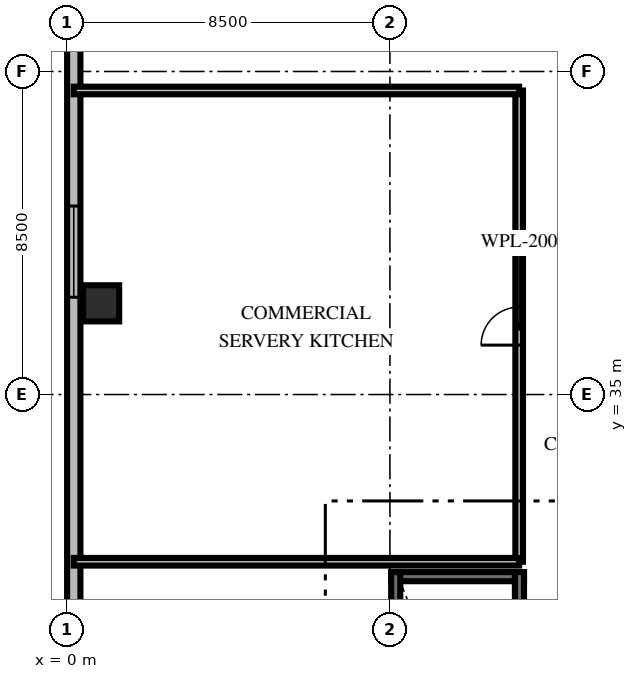
"""IFC4 building model, lengths in metres.
Left out: names, types, materials, properties, quantities, classifications, styles, units other than length and angle.
Written with IfcOpenShell. Run it as: python <this file> out.ifc"""

import sys

from ifc_helpers import new_model, si_unit, direction, frame, frame_2d, origin, origin_2d, place, context, subcontext, project, spatial, rectangle, extrude, element, fill, save


model = new_model("IFC4")
c1 = context("Model", 3, precision=1e-05, world=origin(), true_north=direction((0.0, 1.0)))
c2 = subcontext(c1, "Body", "Model", "MODEL_VIEW")
j1 = project(units=[si_unit("LENGTHUNIT", "METRE"), si_unit("PLANEANGLEUNIT", "RADIAN")], contexts=[c1])
p1 = place(None, origin())
s1 = spatial("IfcSite", under=j1, at=p1, CompositionType="ELEMENT")
p2 = place(p1, origin())
s2 = spatial("IfcBuilding", under=s1, at=p2, CompositionType="ELEMENT")
p3 = place(p2, frame((0.0, 0.0, 20.4)))
s3 = spatial("IfcBuildingStorey", under=s2, at=p3, CompositionType="ELEMENT", Elevation=20.4)
p4 = place(p3, frame((8.532, 30.208, 0.0), z_axis=(0.0, 0.0, 1.0), x_axis=(1.0, 0.0, 0.0)))
e1 = element("IfcWall", 1, at=p4, inside=s3, PredefinedType="SHEAR", context=c2, shape_type="SweptSolid", body=[
    extrude(rectangle(XDim=3.496, YDim=0.24, at=frame_2d((1.748, 0.0))), origin(), (0.0, 0.0, 1.0), 4.8),
])
p5 = place(p3, frame((8.652, 20.772, 0.0), z_axis=(0.0, 0.0, 1.0), x_axis=(0.0, 1.0, 0.0)))
e2 = element("IfcWall", 2, at=p5, inside=s3, PredefinedType="SHEAR", context=c2, shape_type="SweptSolid", body=[
    extrude(rectangle(XDim=9.556, YDim=0.24, at=frame_2d((4.778, 0.0))), origin(), (0.0, 0.0, 1.0), 4.8),
])
p6 = place(p3, frame((11.908, 20.772, 0.0), z_axis=(0.0, 0.0, 1.0), x_axis=(0.0, 1.0, 0.0)))
e3 = element("IfcWall", 3, at=p6, inside=s3, PredefinedType="SHEAR", context=c2, shape_type="SweptSolid", body=[
    extrude(rectangle(XDim=9.556, YDim=0.24, at=frame_2d((4.778, 0.0))), origin(), (0.0, 0.0, 1.0), 4.8),
])
p7 = place(p6, frame((0.55, 0.0, 0.0)))
e4 = element("IfcOpeningElement", 4, at=p7, cuts=e3, PredefinedType="OPENING", context=c2, shape_type="SweptSolid", body=[
    extrude(rectangle(XDim=1.05, YDim=2.15, at=frame_2d((0.525, 1.075))), frame((0.0, 0.13, 0.0), z_axis=(0.0, -1.0, 0.0), x_axis=(1.0, 0.0, 0.0)), (0.0, 0.0, 1.0), 0.26),
])
p8 = place(p3, frame((0.9, 37.4, 0.0), z_axis=(0.0, 0.0, 1.0), x_axis=(1.0, 0.0, 0.0)))
e5 = element("IfcColumn", 5, at=p8, inside=s3, PredefinedType="COLUMN", context=c2, shape_type="SweptSolid", body=[
    extrude(rectangle(XDim=0.95, YDim=0.95, at=origin_2d()), origin(), (0.0, 0.0, 1.0), 4.8),
])
p9 = place(p3, frame((0.18, 0.36, 0.0), z_axis=(0.0, 0.0, 1.0), x_axis=(0.0, 1.0, 0.0)))
e6 = element("IfcWall", 6, at=p9, inside=s3, PredefinedType="SOLIDWALL", context=c2, shape_type="SweptSolid", body=[
    extrude(rectangle(XDim=51.28, YDim=0.35, at=frame_2d((25.64, 0.0))), origin(), (0.0, 0.0, 1.0), 3.76),
])
p10 = place(p9, frame((3.2, 0.0, 0.85)))
e7 = element("IfcOpeningElement", 7, at=p10, cuts=e6, PredefinedType="OPENING", context=c2, shape_type="SweptSolid", body=[
    extrude(rectangle(XDim=2.4, YDim=2.4, at=frame_2d((1.2, 1.2))), frame((0.0, 0.185, 0.0), z_axis=(0.0, -1.0, 0.0), x_axis=(1.0, 0.0, 0.0)), (0.0, 0.0, 1.0), 0.37),
])
p11 = place(p9, frame((11.7, 0.0, 0.85)))
e8 = element("IfcOpeningElement", 8, at=p11, cuts=e6, PredefinedType="OPENING", context=c2, shape_type="SweptSolid", body=[
    extrude(rectangle(XDim=2.4, YDim=2.4, at=frame_2d((1.2, 1.2))), frame((0.0, 0.185, 0.0), z_axis=(0.0, -1.0, 0.0), x_axis=(1.0, 0.0, 0.0)), (0.0, 0.0, 1.0), 0.37),
])
p12 = place(p9, frame((22.05, 0.0, 0.85)))
e9 = element("IfcOpeningElement", 9, at=p12, cuts=e6, PredefinedType="OPENING", context=c2, shape_type="SweptSolid", body=[
    extrude(rectangle(XDim=2.4, YDim=2.4, at=frame_2d((1.2, 1.2))), frame((0.0, 0.185, 0.0), z_axis=(0.0, -1.0, 0.0), x_axis=(1.0, 0.0, 0.0)), (0.0, 0.0, 1.0), 0.37),
])
p13 = place(p9, frame((37.2, 0.0, 0.85)))
e10 = element("IfcOpeningElement", 10, at=p13, cuts=e6, PredefinedType="OPENING", context=c2, shape_type="SweptSolid", body=[
    extrude(rectangle(XDim=2.4, YDim=2.4, at=frame_2d((1.2, 1.2))), frame((0.0, 0.185, 0.0), z_axis=(0.0, -1.0, 0.0), x_axis=(1.0, 0.0, 0.0)), (0.0, 0.0, 1.0), 0.37),
])
p14 = place(p3, frame((11.9, 30.6, 0.0), z_axis=(0.0, 0.0, 1.0), x_axis=(0.0, 1.0, 0.0)))
e11 = element("IfcWall", 11, at=p14, inside=s3, PredefinedType="PLUMBINGWALL", context=c2, shape_type="SweptSolid", body=[
    extrude(rectangle(XDim=12.4, YDim=0.2, at=frame_2d((6.2, 0.0))), origin(), (0.0, 0.0, 1.0), 3.56),
])
p15 = place(p14, frame((5.7, 0.0, 0.0)))
e12 = element("IfcOpeningElement", 12, at=p15, cuts=e11, PredefinedType="OPENING", context=c2, shape_type="SweptSolid", body=[
    extrude(rectangle(XDim=1.0, YDim=2.15, at=frame_2d((0.5, 1.075))), frame((0.0, 0.11, 0.0), z_axis=(0.0, -1.0, 0.0), x_axis=(1.0, 0.0, 0.0)), (0.0, 0.0, 1.0), 0.22),
])
for number, where, z_axis, x_axis in (
    (13, (0.18, 30.6, 0.0), (0.0, 0.0, 1.0), (1.0, 0.0, 0.0)),
    (14, (11.9, 43.0, 0.0), (0.0, 0.0, 1.0), (-1.0, 0.0, 0.0)),
):
    element("IfcWall", number, at=place(p3, frame(where, z_axis=z_axis, x_axis=x_axis)), inside=s3, PredefinedType="PLUMBINGWALL", context=c2, shape_type="SweptSolid", body=[
        extrude(rectangle(XDim=11.72, YDim=0.2, at=frame_2d((5.86, 0.0))), origin(), (0.0, 0.0, 1.0), 3.56),
    ])
p16 = place(p13, origin())
e15 = element("IfcWindow", 15, at=p16, inside=s3, PartitioningType="SINGLE_PANEL", PredefinedType="WINDOW", context=c2, shape_type="SweptSolid", body=[
    extrude(rectangle(XDim=2.4, YDim=2.4, at=frame_2d((1.2, 1.2))), frame((0.0, 0.03, 0.0), z_axis=(0.0, -1.0, 0.0), x_axis=(1.0, 0.0, 0.0)), (0.0, 0.0, 1.0), 0.06),
])
fill(e10, e15)
p17 = place(p15, origin())
e16 = element("IfcDoor", 16, at=p17, inside=s3, OperationType="SINGLE_SWING_LEFT", PredefinedType="DOOR", context=c2, shape_type="SweptSolid", body=[
    extrude(rectangle(XDim=1.0, YDim=2.15, at=frame_2d((0.5, 1.075))), frame((0.0, 0.025, 0.0), z_axis=(0.0, -1.0, 0.0), x_axis=(1.0, 0.0, 0.0)), (0.0, 0.0, 1.0), 0.05),
])
fill(e12, e16)
save(model, sys.argv[1])
